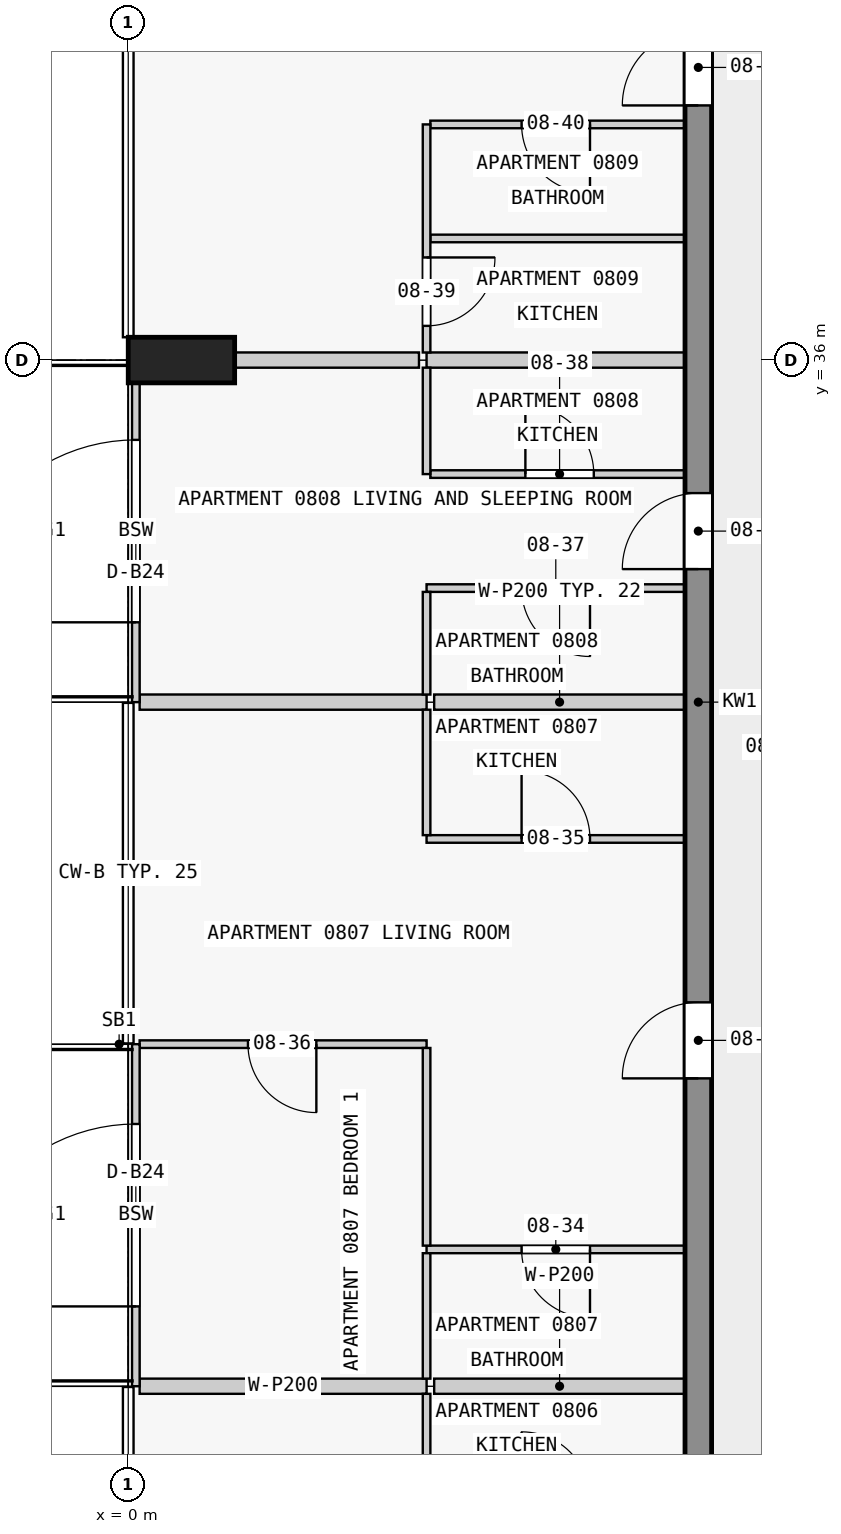
"""IFC4 building model, lengths in metres.
Left out: names, types, materials, properties, quantities, classifications, styles, units other than length and angle.
Written with IfcOpenShell. Run it as: python <this file> out.ifc"""

import sys

from ifc_helpers import new_model, si_unit, direction, frame, frame_2d, origin, origin_2d, place, context, subcontext, project, spatial, rectangle, extrude, element, fill, save


model = new_model("IFC4")
c1 = context("Model", 3, precision=1e-05, world=origin(), true_north=direction((0.0, 1.0)))
c2 = subcontext(c1, "Body", "Model", "MODEL_VIEW")
j1 = project(units=[si_unit("LENGTHUNIT", "METRE"), si_unit("PLANEANGLEUNIT", "RADIAN")], contexts=[c1])
p1 = place(None, origin())
s1 = spatial("IfcSite", under=j1, at=p1, CompositionType="ELEMENT")
p2 = place(p1, origin())
s2 = spatial("IfcBuilding", under=s1, at=p2, CompositionType="ELEMENT")
p3 = place(p2, frame((0.0, 0.0, 37.3)))
s3 = spatial("IfcBuildingStorey", under=s2, at=p3, CompositionType="ELEMENT", Elevation=37.3)
p4 = place(p3, frame((0.7, 36.0, 0.0), z_axis=(0.0, 0.0, 1.0), x_axis=(0.0, 1.0, 0.0)))
e1 = element("IfcColumn", 1, at=p4, inside=s3, PredefinedType="COLUMN", context=c2, shape_type="SweptSolid", body=[
    extrude(rectangle(XDim=0.6, YDim=1.4, at=origin_2d()), origin(), (0.0, 0.0, 1.0), 3.5),
])
p5 = place(p3, frame((7.5, 18.0, 0.0), z_axis=(0.0, 0.0, 1.0), x_axis=(0.0, 1.0, 0.0)))
e2 = element("IfcWall", 2, at=p5, inside=s3, PredefinedType="SHEAR", context=c2, shape_type="SweptSolid", body=[
    extrude(rectangle(XDim=27.0, YDim=0.35, at=frame_2d((13.5, 0.0))), origin(), (0.0, 0.0, 1.0), 3.25),
])
p6 = place(p5, frame((1.75, 0.0, 0.0)))
e3 = element("IfcOpeningElement", 3, at=p6, cuts=e2, PredefinedType="OPENING", context=c2, shape_type="SweptSolid", body=[
    extrude(rectangle(XDim=1.0, YDim=2.1, at=frame_2d((0.5, 1.05))), frame((0.0, 0.185, 0.0), z_axis=(0.0, -1.0, 0.0), x_axis=(1.0, 0.0, 0.0)), (0.0, 0.0, 1.0), 0.37),
])
p7 = place(p5, frame((8.55, 0.0, 0.0)))
e4 = element("IfcOpeningElement", 4, at=p7, cuts=e2, PredefinedType="OPENING", context=c2, shape_type="SweptSolid", body=[
    extrude(rectangle(XDim=1.0, YDim=2.1, at=frame_2d((0.5, 1.05))), frame((0.0, 0.185, 0.0), z_axis=(0.0, -1.0, 0.0), x_axis=(1.0, 0.0, 0.0)), (0.0, 0.0, 1.0), 0.37),
])
p8 = place(p5, frame((15.25, 0.0, 0.0)))
e5 = element("IfcOpeningElement", 5, at=p8, cuts=e2, PredefinedType="OPENING", context=c2, shape_type="SweptSolid", body=[
    extrude(rectangle(XDim=1.0, YDim=2.1, at=frame_2d((0.5, 1.05))), frame((0.0, 0.185, 0.0), z_axis=(0.0, -1.0, 0.0), x_axis=(1.0, 0.0, 0.0)), (0.0, 0.0, 1.0), 0.37),
])
p9 = place(p5, frame((21.35, 0.0, 0.0)))
e6 = element("IfcOpeningElement", 6, at=p9, cuts=e2, PredefinedType="OPENING", context=c2, shape_type="SweptSolid", body=[
    extrude(rectangle(XDim=1.0, YDim=2.1, at=frame_2d((0.5, 1.05))), frame((0.0, 0.185, 0.0), z_axis=(0.0, -1.0, 0.0), x_axis=(1.0, 0.0, 0.0)), (0.0, 0.0, 1.0), 0.37),
])
p10 = place(p3, frame((0.1, 22.5, 0.0), z_axis=(0.0, 0.0, 1.0), x_axis=(0.0, 1.0, 0.0)))
e7 = element("IfcWall", 7, at=p10, inside=s3, PredefinedType="STANDARD", context=c2, shape_type="SweptSolid", body=[
    extrude(rectangle(XDim=4.5, YDim=0.1, at=frame_2d((2.25, 0.0))), origin(), (0.0, 0.0, 1.0), 3.25),
])
p11 = place(p10, frame((1.05, 0.0, 0.0)))
e8 = element("IfcOpeningElement", 8, at=p11, cuts=e7, PredefinedType="OPENING", context=c2, shape_type="SweptSolid", body=[
    extrude(rectangle(XDim=2.4, YDim=2.4, at=frame_2d((1.2, 1.2))), frame((0.0, 0.06, 0.0), z_axis=(0.0, -1.0, 0.0), x_axis=(1.0, 0.0, 0.0)), (0.0, 0.0, 1.0), 0.12),
])
p12 = place(p3, frame((0.1, 31.5, 0.0), z_axis=(0.0, 0.0, 1.0), x_axis=(0.0, 1.0, 0.0)))
e9 = element("IfcWall", 9, at=p12, inside=s3, PredefinedType="STANDARD", context=c2, shape_type="SweptSolid", body=[
    extrude(rectangle(XDim=4.5, YDim=0.1, at=frame_2d((2.25, 0.0))), origin(), (0.0, 0.0, 1.0), 3.25),
])
p13 = place(p12, frame((1.05, 0.0, 0.0)))
e10 = element("IfcOpeningElement", 10, at=p13, cuts=e9, PredefinedType="OPENING", context=c2, shape_type="SweptSolid", body=[
    extrude(rectangle(XDim=2.4, YDim=2.4, at=frame_2d((1.2, 1.2))), frame((0.0, 0.06, 0.0), z_axis=(0.0, -1.0, 0.0), x_axis=(1.0, 0.0, 0.0)), (0.0, 0.0, 1.0), 0.12),
])
p14 = place(p3, frame((7.325, 22.5, 0.0), z_axis=(0.0, 0.0, 1.0), x_axis=(-1.0, 0.0, 0.0)))
e11 = element("IfcWall", 11, at=p14, inside=s3, PredefinedType="PARTITIONING", context=c2, shape_type="SweptSolid", body=[
    extrude(rectangle(XDim=3.3, YDim=0.2, at=frame_2d((1.65, 0.0))), origin(), (0.0, 0.0, 1.0), 3.25),
])
p15 = place(p3, frame((0.15, 22.5, 0.0), z_axis=(0.0, 0.0, 1.0), x_axis=(1.0, 0.0, 0.0)))
e12 = element("IfcWall", 12, at=p15, inside=s3, PredefinedType="PARTITIONING", context=c2, shape_type="SweptSolid", body=[
    extrude(rectangle(XDim=3.775, YDim=0.2, at=frame_2d((1.888, 0.0))), origin(), (0.0, 0.0, 1.0), 3.25),
])
p16 = place(p3, frame((7.325, 24.3, 0.0), z_axis=(0.0, 0.0, 1.0), x_axis=(-1.0, 0.0, 0.0)))
e13 = element("IfcWall", 13, at=p16, inside=s3, PredefinedType="PARTITIONING", context=c2, shape_type="SweptSolid", body=[
    extrude(rectangle(XDim=3.4, YDim=0.1, at=frame_2d((1.7, 0.0))), origin(), (0.0, 0.0, 1.0), 3.25),
])
p17 = place(p16, frame((1.25, 0.0, 0.0)))
e14 = element("IfcOpeningElement", 14, at=p17, cuts=e13, PredefinedType="OPENING", context=c2, shape_type="SweptSolid", body=[
    extrude(rectangle(XDim=0.9, YDim=2.1, at=frame_2d((0.45, 1.05))), frame((0.0, 0.06, 0.0), z_axis=(0.0, -1.0, 0.0), x_axis=(1.0, 0.0, 0.0)), (0.0, 0.0, 1.0), 0.12),
])
p18 = place(p3, frame((3.925, 27.0, 0.0), z_axis=(0.0, 0.0, 1.0), x_axis=(-1.0, 0.0, 0.0)))
e15 = element("IfcWall", 15, at=p18, inside=s3, PredefinedType="PARTITIONING", context=c2, shape_type="SweptSolid", body=[
    extrude(rectangle(XDim=3.775, YDim=0.1, at=frame_2d((1.888, 0.0))), origin(), (0.0, 0.0, 1.0), 3.25),
])
p19 = place(p18, frame((1.45, 0.0, 0.0)))
e16 = element("IfcOpeningElement", 16, at=p19, cuts=e15, PredefinedType="OPENING", context=c2, shape_type="SweptSolid", body=[
    extrude(rectangle(XDim=0.9, YDim=2.1, at=frame_2d((0.45, 1.05))), frame((0.0, 0.06, 0.0), z_axis=(0.0, -1.0, 0.0), x_axis=(1.0, 0.0, 0.0)), (0.0, 0.0, 1.0), 0.12),
])
p20 = place(p3, frame((3.925, 29.7, 0.0), z_axis=(0.0, 0.0, 1.0), x_axis=(1.0, 0.0, 0.0)))
e17 = element("IfcWall", 17, at=p20, inside=s3, PredefinedType="PARTITIONING", context=c2, shape_type="SweptSolid", body=[
    extrude(rectangle(XDim=3.4, YDim=0.1, at=frame_2d((1.7, 0.0))), origin(), (0.0, 0.0, 1.0), 3.25),
])
p21 = place(p20, frame((1.25, 0.0, 0.0)))
e18 = element("IfcOpeningElement", 18, at=p21, cuts=e17, PredefinedType="OPENING", context=c2, shape_type="SweptSolid", body=[
    extrude(rectangle(XDim=0.9, YDim=2.1, at=frame_2d((0.45, 1.05))), frame((0.0, 0.06, 0.0), z_axis=(0.0, -1.0, 0.0), x_axis=(1.0, 0.0, 0.0)), (0.0, 0.0, 1.0), 0.12),
])
p22 = place(p3, frame((7.325, 31.5, 0.0), z_axis=(0.0, 0.0, 1.0), x_axis=(-1.0, 0.0, 0.0)))
e19 = element("IfcWall", 19, at=p22, inside=s3, PredefinedType="PARTITIONING", context=c2, shape_type="SweptSolid", body=[
    extrude(rectangle(XDim=3.3, YDim=0.2, at=frame_2d((1.65, 0.0))), origin(), (0.0, 0.0, 1.0), 3.25),
])
p23 = place(p3, frame((0.15, 31.5, 0.0), z_axis=(0.0, 0.0, 1.0), x_axis=(1.0, 0.0, 0.0)))
e20 = element("IfcWall", 20, at=p23, inside=s3, PredefinedType="PARTITIONING", context=c2, shape_type="SweptSolid", body=[
    extrude(rectangle(XDim=3.775, YDim=0.2, at=frame_2d((1.888, 0.0))), origin(), (0.0, 0.0, 1.0), 3.25),
])
p24 = place(p3, frame((7.325, 33.0, 0.0), z_axis=(0.0, 0.0, 1.0), x_axis=(-1.0, 0.0, 0.0)))
e21 = element("IfcWall", 21, at=p24, inside=s3, PredefinedType="PARTITIONING", context=c2, shape_type="SweptSolid", body=[
    extrude(rectangle(XDim=3.4, YDim=0.1, at=frame_2d((1.7, 0.0))), origin(), (0.0, 0.0, 1.0), 3.25),
])
p25 = place(p24, frame((1.25, 0.0, 0.0)))
e22 = element("IfcOpeningElement", 22, at=p25, cuts=e21, PredefinedType="OPENING", context=c2, shape_type="SweptSolid", body=[
    extrude(rectangle(XDim=0.9, YDim=2.1, at=frame_2d((0.45, 1.05))), frame((0.0, 0.06, 0.0), z_axis=(0.0, -1.0, 0.0), x_axis=(1.0, 0.0, 0.0)), (0.0, 0.0, 1.0), 0.12),
])
p26 = place(p3, frame((3.975, 34.5, 0.0), z_axis=(0.0, 0.0, 1.0), x_axis=(1.0, 0.0, 0.0)))
e23 = element("IfcWall", 23, at=p26, inside=s3, PredefinedType="PARTITIONING", context=c2, shape_type="SweptSolid", body=[
    extrude(rectangle(XDim=3.35, YDim=0.1, at=frame_2d((1.675, 0.0))), origin(), (0.0, 0.0, 1.0), 3.25),
])
p27 = place(p26, frame((1.25, 0.0, 0.0)))
e24 = element("IfcOpeningElement", 24, at=p27, cuts=e23, PredefinedType="OPENING", context=c2, shape_type="SweptSolid", body=[
    extrude(rectangle(XDim=0.9, YDim=2.1, at=frame_2d((0.45, 1.05))), frame((0.0, 0.06, 0.0), z_axis=(0.0, -1.0, 0.0), x_axis=(1.0, 0.0, 0.0)), (0.0, 0.0, 1.0), 0.12),
])
p28 = place(p3, frame((7.325, 36.0, 0.0), z_axis=(0.0, 0.0, 1.0), x_axis=(-1.0, 0.0, 0.0)))
e25 = element("IfcWall", 25, at=p28, inside=s3, PredefinedType="PARTITIONING", context=c2, shape_type="SweptSolid", body=[
    extrude(rectangle(XDim=3.4, YDim=0.2, at=frame_2d((1.7, 0.0))), origin(), (0.0, 0.0, 1.0), 3.25),
])
p29 = place(p3, frame((1.4, 36.0, 0.0), z_axis=(0.0, 0.0, 1.0), x_axis=(1.0, 0.0, 0.0)))
e26 = element("IfcWall", 26, at=p29, inside=s3, PredefinedType="PARTITIONING", context=c2, shape_type="SweptSolid", body=[
    extrude(rectangle(XDim=2.425, YDim=0.2, at=frame_2d((1.212, 0.0))), origin(), (0.0, 0.0, 1.0), 3.25),
])
p30 = place(p3, frame((7.325, 37.6, 0.0), z_axis=(0.0, 0.0, 1.0), x_axis=(-1.0, 0.0, 0.0)))
e27 = element("IfcWall", 27, at=p30, inside=s3, PredefinedType="PARTITIONING", context=c2, shape_type="SweptSolid", body=[
    extrude(rectangle(XDim=3.35, YDim=0.1, at=frame_2d((1.675, 0.0))), origin(), (0.0, 0.0, 1.0), 3.25),
])
p31 = place(p3, frame((7.325, 39.1, 0.0), z_axis=(0.0, 0.0, 1.0), x_axis=(-1.0, 0.0, 0.0)))
e28 = element("IfcWall", 28, at=p31, inside=s3, PredefinedType="PARTITIONING", context=c2, shape_type="SweptSolid", body=[
    extrude(rectangle(XDim=3.35, YDim=0.1, at=frame_2d((1.675, 0.0))), origin(), (0.0, 0.0, 1.0), 3.25),
])
p32 = place(p31, frame((1.25, 0.0, 0.0)))
e29 = element("IfcOpeningElement", 29, at=p32, cuts=e28, PredefinedType="OPENING", context=c2, shape_type="SweptSolid", body=[
    extrude(rectangle(XDim=0.9, YDim=2.1, at=frame_2d((0.45, 1.05))), frame((0.0, 0.06, 0.0), z_axis=(0.0, -1.0, 0.0), x_axis=(1.0, 0.0, 0.0)), (0.0, 0.0, 1.0), 0.12),
])
p33 = place(p3, frame((3.925, 22.4, 0.0), z_axis=(0.0, 0.0, 1.0), x_axis=(0.0, -1.0, 0.0)))
e30 = element("IfcWall", 30, at=p33, inside=s3, PredefinedType="PARTITIONING", context=c2, shape_type="SweptSolid", body=[
    extrude(rectangle(XDim=1.35, YDim=0.1, at=frame_2d((0.675, 0.0))), origin(), (0.0, 0.0, 1.0), 3.25),
])
for number, where, z_axis, x_axis in (
    (31, (3.925, 24.25, 0.0), (0.0, 0.0, 1.0), (0.0, -1.0, 0.0)),
    (32, (3.925, 31.4, 0.0), (0.0, 0.0, 1.0), (0.0, -1.0, 0.0)),
):
    element("IfcWall", number, at=place(p3, frame(where, z_axis=z_axis, x_axis=x_axis)), inside=s3, PredefinedType="PARTITIONING", context=c2, shape_type="SweptSolid", body=[
        extrude(rectangle(XDim=1.65, YDim=0.1, at=frame_2d((0.825, 0.0))), origin(), (0.0, 0.0, 1.0), 3.25),
    ])
p34 = place(p3, frame((3.925, 32.95, 0.0), z_axis=(0.0, 0.0, 1.0), x_axis=(0.0, -1.0, 0.0)))
e33 = element("IfcWall", 33, at=p34, inside=s3, PredefinedType="PARTITIONING", context=c2, shape_type="SweptSolid", body=[
    extrude(rectangle(XDim=1.35, YDim=0.1, at=frame_2d((0.675, 0.0))), origin(), (0.0, 0.0, 1.0), 3.25),
])
p35 = place(p3, frame((3.925, 35.9, 0.0), z_axis=(0.0, 0.0, 1.0), x_axis=(0.0, -1.0, 0.0)))
e34 = element("IfcWall", 34, at=p35, inside=s3, PredefinedType="PARTITIONING", context=c2, shape_type="SweptSolid", body=[
    extrude(rectangle(XDim=1.4, YDim=0.1, at=frame_2d((0.7, 0.0))), origin(), (0.0, 0.0, 1.0), 3.25),
])
p36 = place(p3, frame((3.925, 39.1, 0.0), z_axis=(0.0, 0.0, 1.0), x_axis=(0.0, -1.0, 0.0)))
e35 = element("IfcWall", 35, at=p36, inside=s3, PredefinedType="PARTITIONING", context=c2, shape_type="SweptSolid", body=[
    extrude(rectangle(XDim=3.0, YDim=0.1, at=frame_2d((1.5, 0.0))), origin(), (0.0, 0.0, 1.0), 3.25),
])
p37 = place(p36, frame((1.75, 0.0, 0.0)))
e36 = element("IfcOpeningElement", 36, at=p37, cuts=e35, PredefinedType="OPENING", context=c2, shape_type="SweptSolid", body=[
    extrude(rectangle(XDim=0.9, YDim=2.1, at=frame_2d((0.45, 1.05))), frame((0.0, 0.06, 0.0), z_axis=(0.0, -1.0, 0.0), x_axis=(1.0, 0.0, 0.0)), (0.0, 0.0, 1.0), 0.12),
])
p38 = place(p3, frame((3.925, 24.35, 0.0), z_axis=(0.0, 0.0, 1.0), x_axis=(0.0, 1.0, 0.0)))
e37 = element("IfcWall", 37, at=p38, inside=s3, PredefinedType="PARTITIONING", context=c2, shape_type="SweptSolid", body=[
    extrude(rectangle(XDim=2.6, YDim=0.1, at=frame_2d((1.3, 0.0))), origin(), (0.0, 0.0, 1.0), 3.25),
])
p39 = place(p11, origin())
e38 = element("IfcDoor", 38, at=p39, inside=s3, OperationType="SINGLE_SWING_LEFT", PredefinedType="DOOR", context=c2, shape_type="SweptSolid", body=[
    extrude(rectangle(XDim=2.4, YDim=2.4, at=frame_2d((1.2, 1.2))), frame((0.0, 0.025, 0.0), z_axis=(0.0, -1.0, 0.0), x_axis=(1.0, 0.0, 0.0)), (0.0, 0.0, 1.0), 0.05),
])
fill(e8, e38)
p40 = place(p13, origin())
e39 = element("IfcDoor", 39, at=p40, inside=s3, OperationType="SINGLE_SWING_LEFT", PredefinedType="DOOR", context=c2, shape_type="SweptSolid", body=[
    extrude(rectangle(XDim=2.4, YDim=2.4, at=frame_2d((1.2, 1.2))), frame((0.0, 0.025, 0.0), z_axis=(0.0, -1.0, 0.0), x_axis=(1.0, 0.0, 0.0)), (0.0, 0.0, 1.0), 0.05),
])
fill(e10, e39)
p41 = place(p7, origin())
e40 = element("IfcDoor", 40, at=p41, inside=s3, OperationType="SINGLE_SWING_LEFT", PredefinedType="DOOR", context=c2, shape_type="SweptSolid", body=[
    extrude(rectangle(XDim=1.0, YDim=2.1, at=frame_2d((0.5, 1.05))), frame((0.0, 0.025, 0.0), z_axis=(0.0, -1.0, 0.0), x_axis=(1.0, 0.0, 0.0)), (0.0, 0.0, 1.0), 0.05),
])
fill(e4, e40)
p42 = place(p8, origin())
e41 = element("IfcDoor", 41, at=p42, inside=s3, OperationType="SINGLE_SWING_RIGHT", PredefinedType="DOOR", context=c2, shape_type="SweptSolid", body=[
    extrude(rectangle(XDim=1.0, YDim=2.1, at=frame_2d((0.5, 1.05))), frame((0.0, 0.025, 0.0), z_axis=(0.0, -1.0, 0.0), x_axis=(1.0, 0.0, 0.0)), (0.0, 0.0, 1.0), 0.05),
])
fill(e5, e41)
p43 = place(p9, origin())
e42 = element("IfcDoor", 42, at=p43, inside=s3, OperationType="SINGLE_SWING_RIGHT", PredefinedType="DOOR", context=c2, shape_type="SweptSolid", body=[
    extrude(rectangle(XDim=1.0, YDim=2.1, at=frame_2d((0.5, 1.05))), frame((0.0, 0.025, 0.0), z_axis=(0.0, -1.0, 0.0), x_axis=(1.0, 0.0, 0.0)), (0.0, 0.0, 1.0), 0.05),
])
fill(e6, e42)
p44 = place(p17, origin())
e43 = element("IfcDoor", 43, at=p44, inside=s3, OperationType="SINGLE_SWING_LEFT", PredefinedType="DOOR", context=c2, shape_type="SweptSolid", body=[
    extrude(rectangle(XDim=0.9, YDim=2.1, at=frame_2d((0.45, 1.05))), frame((0.0, 0.025, 0.0), z_axis=(0.0, -1.0, 0.0), x_axis=(1.0, 0.0, 0.0)), (0.0, 0.0, 1.0), 0.05),
])
fill(e14, e43)
p45 = place(p21, origin())
e44 = element("IfcDoor", 44, at=p45, inside=s3, OperationType="SINGLE_SWING_LEFT", PredefinedType="DOOR", context=c2, shape_type="SweptSolid", body=[
    extrude(rectangle(XDim=0.9, YDim=2.1, at=frame_2d((0.45, 1.05))), frame((0.0, 0.025, 0.0), z_axis=(0.0, -1.0, 0.0), x_axis=(1.0, 0.0, 0.0)), (0.0, 0.0, 1.0), 0.05),
])
fill(e18, e44)
p46 = place(p19, origin())
e45 = element("IfcDoor", 45, at=p46, inside=s3, OperationType="SINGLE_SWING_RIGHT", PredefinedType="DOOR", context=c2, shape_type="SweptSolid", body=[
    extrude(rectangle(XDim=0.9, YDim=2.1, at=frame_2d((0.45, 1.05))), frame((0.0, 0.025, 0.0), z_axis=(0.0, -1.0, 0.0), x_axis=(1.0, 0.0, 0.0)), (0.0, 0.0, 1.0), 0.05),
])
fill(e16, e45)
p47 = place(p25, origin())
e46 = element("IfcDoor", 46, at=p47, inside=s3, OperationType="SINGLE_SWING_LEFT", PredefinedType="DOOR", context=c2, shape_type="SweptSolid", body=[
    extrude(rectangle(XDim=0.9, YDim=2.1, at=frame_2d((0.45, 1.05))), frame((0.0, 0.025, 0.0), z_axis=(0.0, -1.0, 0.0), x_axis=(1.0, 0.0, 0.0)), (0.0, 0.0, 1.0), 0.05),
])
fill(e22, e46)
p48 = place(p27, origin())
e47 = element("IfcDoor", 47, at=p48, inside=s3, OperationType="SINGLE_SWING_RIGHT", PredefinedType="DOOR", context=c2, shape_type="SweptSolid", body=[
    extrude(rectangle(XDim=0.9, YDim=2.1, at=frame_2d((0.45, 1.05))), frame((0.0, 0.025, 0.0), z_axis=(0.0, -1.0, 0.0), x_axis=(1.0, 0.0, 0.0)), (0.0, 0.0, 1.0), 0.05),
])
fill(e24, e47)
p49 = place(p37, origin())
e48 = element("IfcDoor", 48, at=p49, inside=s3, OperationType="SINGLE_SWING_RIGHT", PredefinedType="DOOR", context=c2, shape_type="SweptSolid", body=[
    extrude(rectangle(XDim=0.9, YDim=2.1, at=frame_2d((0.45, 1.05))), frame((0.0, 0.025, 0.0), z_axis=(0.0, -1.0, 0.0), x_axis=(1.0, 0.0, 0.0)), (0.0, 0.0, 1.0), 0.05),
])
fill(e36, e48)
p50 = place(p32, origin())
e49 = element("IfcDoor", 49, at=p50, inside=s3, OperationType="SINGLE_SWING_RIGHT", PredefinedType="DOOR", context=c2, shape_type="SweptSolid", body=[
    extrude(rectangle(XDim=0.9, YDim=2.1, at=frame_2d((0.45, 1.05))), frame((0.0, 0.025, 0.0), z_axis=(0.0, -1.0, 0.0), x_axis=(1.0, 0.0, 0.0)), (0.0, 0.0, 1.0), 0.05),
])
fill(e29, e49)
save(model, sys.argv[1])
